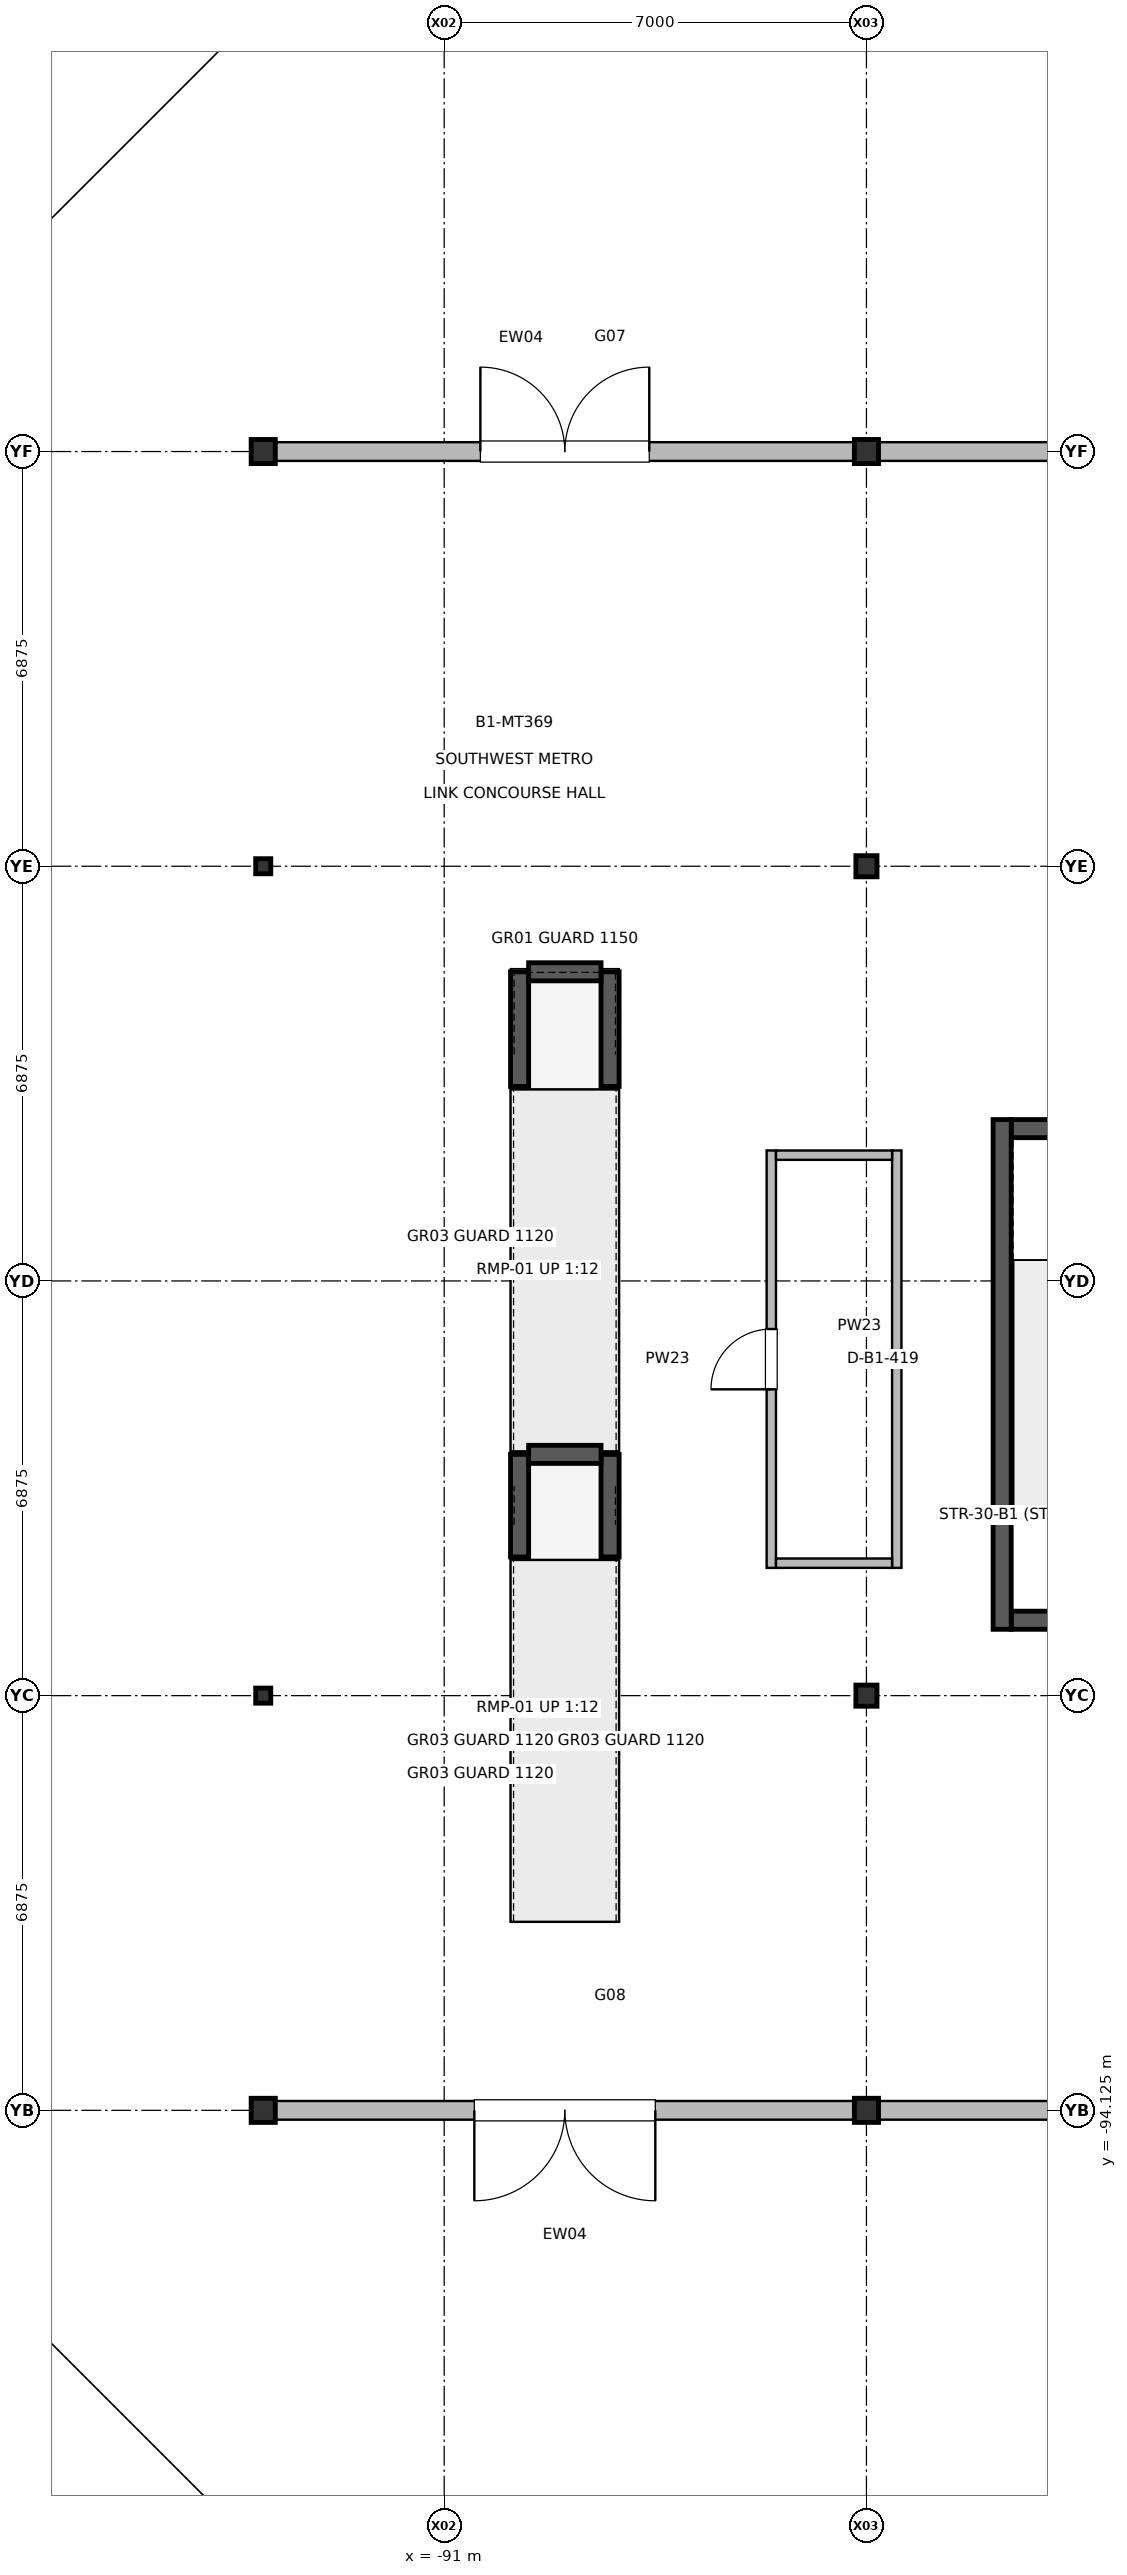
"""IFC4 building model, lengths in metres.
Left out: names, types, materials, properties, quantities, classifications, styles, units other than length and angle.
Written with IfcOpenShell. Run it as: python <this file> out.ifc"""

import sys

from ifc_helpers import new_model, si_unit, direction, frame, frame_2d, origin, origin_2d, place, context, subcontext, project, spatial, rectangle, i_section, extrude, element, fill, save


model = new_model("IFC4")
c1 = context("Model", 3, precision=1e-05, world=origin(), true_north=direction((0.0, 1.0)))
c2 = subcontext(c1, "Body", "Model", "MODEL_VIEW")
j1 = project(units=[si_unit("LENGTHUNIT", "METRE"), si_unit("PLANEANGLEUNIT", "RADIAN")], contexts=[c1])
p1 = place(None, origin())
s1 = spatial("IfcSite", under=j1, at=p1, CompositionType="ELEMENT")
p2 = place(p1, origin())
s2 = spatial("IfcBuilding", under=s1, at=p2, CompositionType="ELEMENT")
p3 = place(p2, frame((0.0, 0.0, -6.0)))
s3 = spatial("IfcBuildingStorey", under=s2, at=p3, CompositionType="ELEMENT", Elevation=-6.0)
p4 = place(p3, frame((-94.0, -94.125, 0.0), z_axis=(0.0, 0.0, 1.0), x_axis=(1.0, 0.0, 0.0)))
e1 = element("IfcColumn", 1, at=p4, inside=s3, PredefinedType="COLUMN", context=c2, shape_type="SweptSolid", body=[
    extrude(i_section(OverallWidth=0.4, OverallDepth=0.4, WebThickness=0.013, FlangeThickness=0.021, at=origin_2d()), origin(), (0.0, 0.0, 1.0), 5.998),
])
for number, where, z_axis, x_axis in (
    (2, (-94.0, -87.25, 0.0), (0.0, 0.0, 1.0), (1.0, 0.0, 0.0)),
    (3, (-94.0, -73.5, 0.0), (0.0, 0.0, 1.0), (1.0, 0.0, 0.0)),
):
    element("IfcColumn", number, at=place(p3, frame(where, z_axis=z_axis, x_axis=x_axis)), inside=s3, PredefinedType="COLUMN", context=c2, shape_type="SweptSolid", body=[
        extrude(i_section(OverallWidth=0.25, OverallDepth=0.25, WebThickness=0.009, FlangeThickness=0.014, at=origin_2d()), origin(), (0.0, 0.0, 1.0), 5.998),
    ])
for number, where, z_axis, x_axis in (
    (4, (-94.0, -66.625, 0.0), (0.0, 0.0, 1.0), (1.0, 0.0, 0.0)),
    (5, (-84.0, -94.125, 0.0), (0.0, 0.0, 1.0), (1.0, 0.0, 0.0)),
):
    element("IfcColumn", number, at=place(p3, frame(where, z_axis=z_axis, x_axis=x_axis)), inside=s3, PredefinedType="COLUMN", context=c2, shape_type="SweptSolid", body=[
        extrude(i_section(OverallWidth=0.4, OverallDepth=0.4, WebThickness=0.013, FlangeThickness=0.021, at=origin_2d()), origin(), (0.0, 0.0, 1.0), 5.998),
    ])
for number, where, z_axis, x_axis in (
    (6, (-84.0, -87.25, 0.0), (0.0, 0.0, 1.0), (1.0, 0.0, 0.0)),
    (7, (-84.0, -73.5, 0.0), (0.0, 0.0, 1.0), (1.0, 0.0, 0.0)),
):
    element("IfcColumn", number, at=place(p3, frame(where, z_axis=z_axis, x_axis=x_axis)), inside=s3, PredefinedType="COLUMN", context=c2, shape_type="SweptSolid", body=[
        extrude(i_section(OverallWidth=0.35, OverallDepth=0.35, WebThickness=0.012, FlangeThickness=0.019, at=origin_2d()), origin(), (0.0, 0.0, 1.0), 5.998),
    ])
p5 = place(p3, frame((-84.0, -66.625, 0.0), z_axis=(0.0, 0.0, 1.0), x_axis=(1.0, 0.0, 0.0)))
e8 = element("IfcColumn", 8, at=p5, inside=s3, PredefinedType="COLUMN", context=c2, shape_type="SweptSolid", body=[
    extrude(i_section(OverallWidth=0.4, OverallDepth=0.4, WebThickness=0.013, FlangeThickness=0.021, at=origin_2d()), origin(), (0.0, 0.0, 1.0), 5.998),
])
p6 = place(p3, frame((-93.81, -66.625, 0.0), z_axis=(0.0, 0.0, 1.0), x_axis=(1.0, 0.0, 0.0)))
e9 = element("IfcWall", 9, at=p6, inside=s3, PredefinedType="SOLIDWALL", context=c2, shape_type="SweptSolid", body=[
    extrude(rectangle(XDim=9.62, YDim=0.31, at=frame_2d((4.81, 0.0))), origin(), (0.0, 0.0, 1.0), 3.955),
])
p7 = place(p6, frame((3.41, 0.0, 0.0)))
e10 = element("IfcOpeningElement", 10, at=p7, cuts=e9, PredefinedType="OPENING", context=c2, shape_type="SweptSolid", body=[
    extrude(rectangle(XDim=2.8, YDim=2.6, at=frame_2d((1.4, 1.3))), frame((0.0, 0.165, 0.0), z_axis=(0.0, -1.0, 0.0), x_axis=(1.0, 0.0, 0.0)), (0.0, 0.0, 1.0), 0.33),
])
p8 = place(p3, frame((-84.19, -94.125, 0.0), z_axis=(0.0, 0.0, 1.0), x_axis=(-1.0, 0.0, 0.0)))
e11 = element("IfcWall", 11, at=p8, inside=s3, PredefinedType="SOLIDWALL", context=c2, shape_type="SweptSolid", body=[
    extrude(rectangle(XDim=9.62, YDim=0.31, at=frame_2d((4.81, 0.0))), origin(), (0.0, 0.0, 1.0), 4.655),
])
p9 = place(p8, frame((3.31, 0.0, 0.0)))
e12 = element("IfcOpeningElement", 12, at=p9, cuts=e11, PredefinedType="OPENING", context=c2, shape_type="SweptSolid", body=[
    extrude(rectangle(XDim=3.0, YDim=2.65, at=frame_2d((1.5, 1.325))), frame((0.0, 0.165, 0.0), z_axis=(0.0, -1.0, 0.0), x_axis=(1.0, 0.0, 0.0)), (0.0, 0.0, 1.0), 0.33),
])
p10 = place(p3, frame((-83.81, -66.625, 0.0), z_axis=(0.0, 0.0, 1.0), x_axis=(1.0, 0.0, 0.0)))
e13 = element("IfcWall", 13, at=p10, inside=s3, PredefinedType="SOLIDWALL", context=c2, shape_type="SweptSolid", body=[
    extrude(rectangle(XDim=13.62, YDim=0.31, at=frame_2d((6.81, 0.0))), origin(), (0.0, 0.0, 1.0), 4.655),
])
p11 = place(p10, frame((5.41, 0.0, 0.0)))
e14 = element("IfcOpeningElement", 14, at=p11, cuts=e13, PredefinedType="OPENING", context=c2, shape_type="SweptSolid", body=[
    extrude(rectangle(XDim=2.8, YDim=2.6, at=frame_2d((1.4, 1.3))), frame((0.0, 0.165, 0.0), z_axis=(0.0, -1.0, 0.0), x_axis=(1.0, 0.0, 0.0)), (0.0, 0.0, 1.0), 0.33),
])
p12 = place(p3, frame((-70.19, -94.125, 0.0), z_axis=(0.0, 0.0, 1.0), x_axis=(-1.0, 0.0, 0.0)))
e15 = element("IfcWall", 15, at=p12, inside=s3, PredefinedType="SOLIDWALL", context=c2, shape_type="SweptSolid", body=[
    extrude(rectangle(XDim=13.62, YDim=0.31, at=frame_2d((6.81, 0.0))), origin(), (0.0, 0.0, 1.0), 4.155),
])
p13 = place(p12, frame((5.31, 0.0, 0.0)))
e16 = element("IfcOpeningElement", 16, at=p13, cuts=e15, PredefinedType="OPENING", context=c2, shape_type="SweptSolid", body=[
    extrude(rectangle(XDim=3.0, YDim=2.65, at=frame_2d((1.5, 1.325))), frame((0.0, 0.165, 0.0), z_axis=(0.0, -1.0, 0.0), x_axis=(1.0, 0.0, 0.0)), (0.0, 0.0, 1.0), 0.33),
])
p14 = place(p3, frame((-85.577, -85.132, 0.0), z_axis=(0.0, 0.0, 1.0), x_axis=(0.0, 1.0, 0.0)))
e17 = element("IfcWall", 17, at=p14, inside=s3, PredefinedType="PARTITIONING", context=c2, shape_type="SweptSolid", body=[
    extrude(rectangle(XDim=6.92, YDim=0.155, at=frame_2d((3.46, 0.0))), origin(), (0.0, 0.0, 1.0), 5.02),
])
p15 = place(p14, frame((2.96, 0.0, 0.0)))
e18 = element("IfcOpeningElement", 18, at=p15, cuts=e17, PredefinedType="OPENING", context=c2, shape_type="SweptSolid", body=[
    extrude(rectangle(XDim=1.0, YDim=2.15, at=frame_2d((0.5, 1.075))), frame((0.0, 0.087, 0.0), z_axis=(0.0, -1.0, 0.0), x_axis=(1.0, 0.0, 0.0)), (0.0, 0.0, 1.0), 0.175),
])
p16 = place(p3, frame((-83.497, -85.132, 0.0), z_axis=(0.0, 0.0, 1.0), x_axis=(0.0, 1.0, 0.0)))
e19 = element("IfcWall", 19, at=p16, inside=s3, PredefinedType="PARTITIONING", context=c2, shape_type="SweptSolid", body=[
    extrude(rectangle(XDim=6.92, YDim=0.155, at=frame_2d((3.46, 0.0))), origin(), (0.0, 0.0, 1.0), 4.555),
])
for number, where, z_axis, x_axis in (
    (20, (-85.499, -85.054, 0.0), (0.0, 0.0, 1.0), (1.0, 0.0, 0.0)),
    (21, (-85.499, -78.29, 0.0), (0.0, 0.0, 1.0), (1.0, 0.0, 0.0)),
):
    element("IfcWall", number, at=place(p3, frame(where, z_axis=z_axis, x_axis=x_axis)), inside=s3, PredefinedType="PARTITIONING", context=c2, shape_type="SweptSolid", body=[
        extrude(rectangle(XDim=1.924, YDim=0.155, at=frame_2d((0.962, 0.0))), origin(), (0.0, 0.0, 1.0), 4.555),
    ])
p17 = place(p3, frame((-81.6, -86.0, 0.0), z_axis=(0.0, 0.0, 1.0), x_axis=(1.0, 0.0, 0.0)))
e22 = element("IfcWall", 22, at=p17, inside=s3, PredefinedType="SHEAR", context=c2, shape_type="SweptSolid", body=[
    extrude(rectangle(XDim=4.2, YDim=0.3, at=frame_2d((2.1, 0.0))), origin(), (0.0, 0.0, 1.0), 5.78),
])
p18 = place(p17, frame((1.375, 0.0, 0.0)))
e23 = element("IfcOpeningElement", 23, at=p18, cuts=e22, PredefinedType="OPENING", context=c2, shape_type="SweptSolid", body=[
    extrude(rectangle(XDim=1.45, YDim=2.2, at=frame_2d((0.725, 1.1))), frame((0.0, 0.16, 0.0), z_axis=(0.0, -1.0, 0.0), x_axis=(1.0, 0.0, 0.0)), (0.0, 0.0, 1.0), 0.32),
])
p19 = place(p3, frame((-81.6, -77.85, 0.0), z_axis=(0.0, 0.0, 1.0), x_axis=(1.0, 0.0, 0.0)))
e24 = element("IfcWall", 24, at=p19, inside=s3, PredefinedType="SHEAR", context=c2, shape_type="SweptSolid", body=[
    extrude(rectangle(XDim=4.2, YDim=0.3, at=frame_2d((2.1, 0.0))), origin(), (0.0, 0.0, 1.0), 5.78),
])
p20 = place(p3, frame((-81.75, -86.15, 0.0), z_axis=(0.0, 0.0, 1.0), x_axis=(0.0, 1.0, 0.0)))
e25 = element("IfcWall", 25, at=p20, inside=s3, PredefinedType="SHEAR", context=c2, shape_type="SweptSolid", body=[
    extrude(rectangle(XDim=8.45, YDim=0.3, at=frame_2d((4.225, 0.0))), origin(), (0.0, 0.0, 1.0), 5.78),
])
for number, where, z_axis, x_axis in (
    (26, (-89.75, -84.95, 0.0), (0.0, 0.0, 1.0), (0.0, 1.0, 0.0)),
    (27, (-88.25, -84.95, 0.0), (0.0, 0.0, 1.0), (0.0, 1.0, 0.0)),
):
    element("IfcWall", number, at=place(p3, frame(where, z_axis=z_axis, x_axis=x_axis)), inside=s3, PredefinedType="SHEAR", context=c2, shape_type="SweptSolid", body=[
        extrude(rectangle(XDim=1.7, YDim=0.3, at=frame_2d((0.85, 0.0))), origin(), (0.0, 0.0, 1.0), 0.3),
    ])
p21 = place(p3, frame((-89.6, -83.25, 0.0), z_axis=(0.0, 0.0, 1.0), x_axis=(1.0, 0.0, 0.0)))
e28 = element("IfcWall", 28, at=p21, inside=s3, PredefinedType="SHEAR", context=c2, shape_type="SweptSolid", body=[
    extrude(rectangle(XDim=1.2, YDim=0.3, at=frame_2d((0.6, 0.0))), origin(), (0.0, 0.0, 1.0), 0.3),
])
for number, where, z_axis, x_axis in (
    (29, (-89.75, -77.15, 0.0), (0.0, 0.0, 1.0), (0.0, 1.0, 0.0)),
    (30, (-88.25, -77.15, 0.0), (0.0, 0.0, 1.0), (0.0, 1.0, 0.0)),
):
    element("IfcWall", number, at=place(p3, frame(where, z_axis=z_axis, x_axis=x_axis)), inside=s3, PredefinedType="SHEAR", context=c2, shape_type="SweptSolid", body=[
        extrude(rectangle(XDim=1.9, YDim=0.3, at=frame_2d((0.95, 0.0))), origin(), (0.0, 0.0, 1.0), 0.8),
    ])
p22 = place(p3, frame((-89.6, -75.25, 0.0), z_axis=(0.0, 0.0, 1.0), x_axis=(1.0, 0.0, 0.0)))
e31 = element("IfcWall", 31, at=p22, inside=s3, PredefinedType="SHEAR", context=c2, shape_type="SweptSolid", body=[
    extrude(rectangle(XDim=1.2, YDim=0.3, at=frame_2d((0.6, 0.0))), origin(), (0.0, 0.0, 1.0), 0.8),
])
p23 = place(p7, origin())
e32 = element("IfcDoor", 32, at=p23, inside=s3, OperationType="DOUBLE_DOOR_SINGLE_SWING", PredefinedType="DOOR", context=c2, shape_type="SweptSolid", body=[
    extrude(rectangle(XDim=2.8, YDim=2.6, at=frame_2d((1.4, 1.3))), frame((0.0, 0.025, 0.0), z_axis=(0.0, -1.0, 0.0), x_axis=(1.0, 0.0, 0.0)), (0.0, 0.0, 1.0), 0.05),
])
fill(e10, e32)
p24 = place(p9, origin())
e33 = element("IfcDoor", 33, at=p24, inside=s3, OperationType="DOUBLE_DOOR_SINGLE_SWING", PredefinedType="DOOR", context=c2, shape_type="SweptSolid", body=[
    extrude(rectangle(XDim=3.0, YDim=2.65, at=frame_2d((1.5, 1.325))), frame((0.0, 0.025, 0.0), z_axis=(0.0, -1.0, 0.0), x_axis=(1.0, 0.0, 0.0)), (0.0, 0.0, 1.0), 0.05),
])
fill(e12, e33)
p25 = place(p15, origin())
e34 = element("IfcDoor", 34, at=p25, inside=s3, OperationType="SINGLE_SWING_LEFT", PredefinedType="DOOR", context=c2, shape_type="SweptSolid", body=[
    extrude(rectangle(XDim=1.0, YDim=2.15, at=frame_2d((0.5, 1.075))), frame((0.0, 0.025, 0.0), z_axis=(0.0, -1.0, 0.0), x_axis=(1.0, 0.0, 0.0)), (0.0, 0.0, 1.0), 0.05),
])
fill(e18, e34)
save(model, sys.argv[1])
